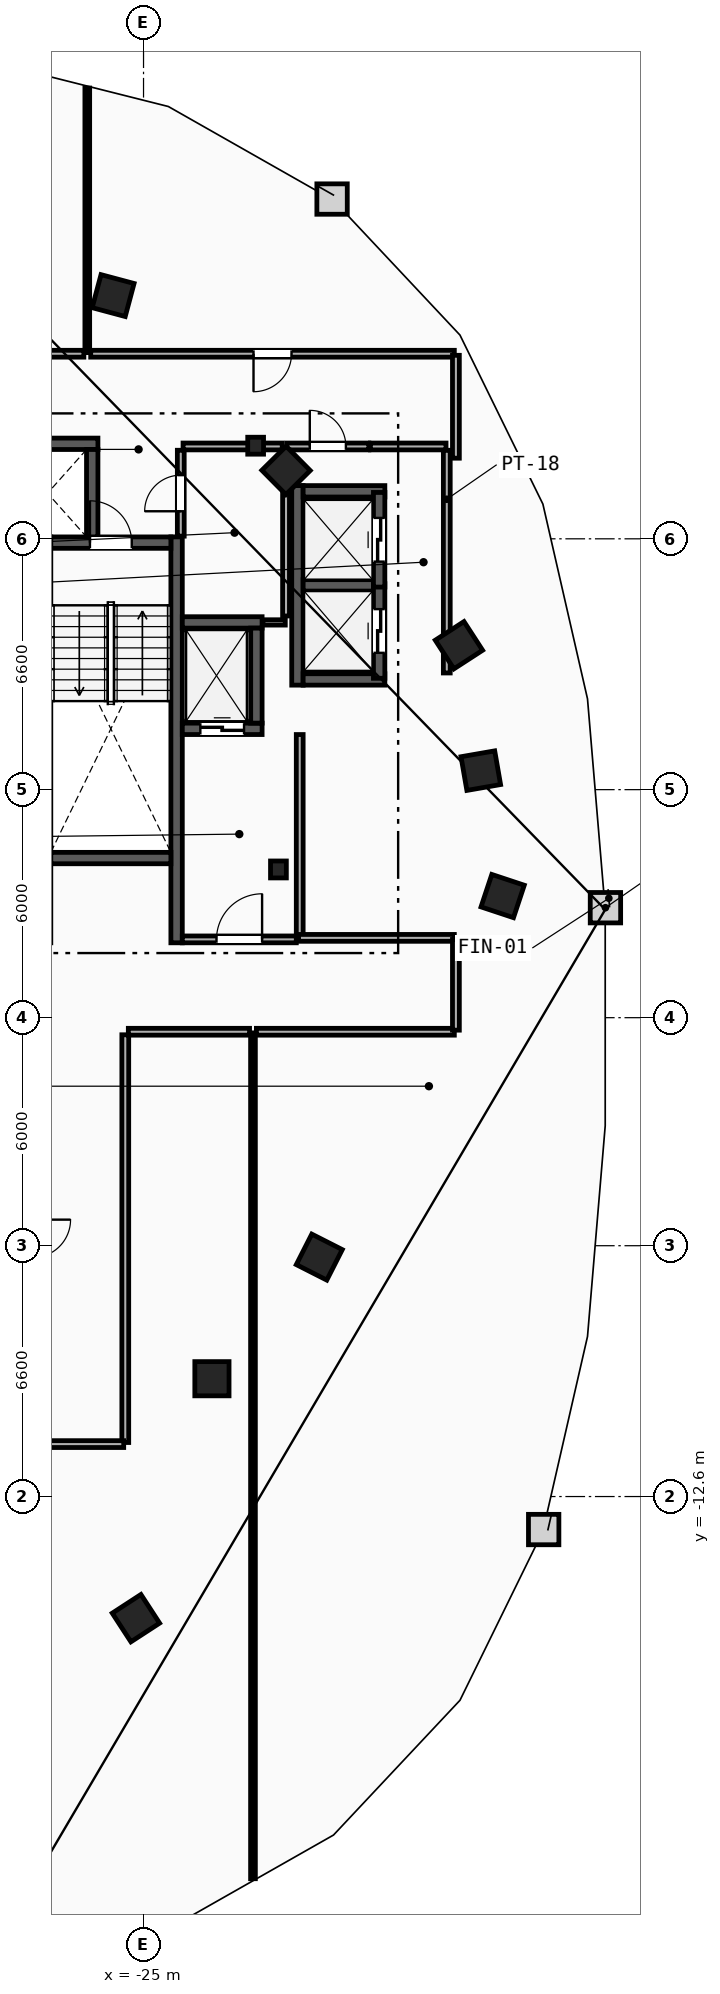
"""IFC4 building model, lengths in metres.
Left out: names, types, materials, properties, quantities, classifications, styles, units other than length and angle.
Written with IfcOpenShell. Run it as: python <this file> out.ifc"""

import sys

from ifc_helpers import new_model, si_unit, direction, frame, frame_2d, origin, origin_2d, place, context, subcontext, project, spatial, rectangle, i_section, extrude, element, fill, save


model = new_model("IFC4")
c1 = context("Model", 3, precision=1e-05, world=origin(), true_north=direction((0.0, 1.0)))
c2 = subcontext(c1, "Body", "Model", "MODEL_VIEW")
j1 = project(units=[si_unit("LENGTHUNIT", "METRE"), si_unit("PLANEANGLEUNIT", "RADIAN")], contexts=[c1])
p1 = place(None, origin())
s1 = spatial("IfcSite", under=j1, at=p1, CompositionType="ELEMENT")
p2 = place(p1, origin())
s2 = spatial("IfcBuilding", under=s1, at=p2, CompositionType="ELEMENT")
p3 = place(p2, frame((0.0, 0.0, 191.8)))
s3 = spatial("IfcBuildingStorey", under=s2, at=p3, CompositionType="ELEMENT", Elevation=191.8)
for number, where, z_axis, x_axis in (
    (1, (-21.45, 3.9, 0.0), (0.0, 0.0, 1.0), (1.0, 0.0, 0.0)),
    (2, (-22.05, 15.05, 0.0), (0.0, 0.0, 1.0), (1.0, 0.0, 0.0)),
):
    element("IfcColumn", number, at=place(p3, frame(where, z_axis=z_axis, x_axis=x_axis)), inside=s3, PredefinedType="COLUMN", context=c2, shape_type="SweptSolid", body=[
        extrude(i_section(OverallWidth=0.416, OverallDepth=0.446, WebThickness=0.039, FlangeThickness=0.063, FilletRadius=0.018, at=origin_2d()), origin(), (0.0, 0.0, 1.0), 3.6),
    ])
for number, where, z_axis, x_axis in (
    (3, (-23.2, -9.5, 0.0), (0.0, 0.0, 1.0), (1.0, 0.0, 0.0)),
    (4, (-15.55, 3.2, 0.0), (0.0, 0.0, 1.0), (0.315, 0.949, 0.0)),
    (5, (-16.125, 6.5, 0.0), (0.0, 0.0, 1.0), (-0.172, 0.985, 0.0)),
    (6, (-16.7, 9.8, 0.0), (0.0, 0.0, 1.0), (-0.544, 0.839, 0.0)),
    (7, (-21.25, 14.4, 0.0), (0.0, 0.0, 1.0), (-0.703, 0.711, 0.0)),
    (8, (-25.8, 19.0, 0.0), (0.0, 0.0, 1.0), (-0.966, 0.259, 0.0)),
    (9, (-25.2, -15.8, 0.0), (0.0, 0.0, 1.0), (0.838, 0.546, 0.0)),
    (10, (-20.375, -6.3, 0.0), (0.0, 0.0, 1.0), (0.453, 0.892, 0.0)),
):
    element("IfcColumn", number, at=place(p3, frame(where, z_axis=z_axis, x_axis=x_axis)), inside=s3, PredefinedType="COLUMN", context=c2, shape_type="SweptSolid", body=[
        extrude(rectangle(XDim=0.9, YDim=0.9, at=origin_2d()), origin(), (0.0, 0.0, 1.0), 3.6),
    ])
p4 = place(p3, frame((-24.13, 1.97, 0.0), z_axis=(0.0, 0.0, 1.0), x_axis=(0.0, 1.0, 0.0)))
e11 = element("IfcWall", 11, at=p4, inside=s3, PredefinedType="SHEAR", context=c2, shape_type="SweptSolid", body=[
    extrude(rectangle(XDim=10.68, YDim=0.3, at=frame_2d((5.34, 0.0))), origin(), (0.0, 0.0, 1.0), 3.34),
])
p5 = place(p3, frame((-27.44, 12.5, 0.0), z_axis=(0.0, 0.0, 1.0), x_axis=(1.0, 0.0, 0.0)))
e12 = element("IfcWall", 12, at=p5, inside=s3, PredefinedType="SHEAR", context=c2, shape_type="SweptSolid", body=[
    extrude(rectangle(XDim=3.16, YDim=0.3, at=frame_2d((1.58, 0.0))), origin(), (0.0, 0.0, 1.0), 3.34),
])
p6 = place(p5, frame((1.03, 0.0, 0.0)))
e13 = element("IfcOpeningElement", 13, at=p6, cuts=e12, PredefinedType="OPENING", context=c2, shape_type="SweptSolid", body=[
    extrude(rectangle(XDim=1.1, YDim=2.15, at=frame_2d((0.55, 1.075))), frame((0.0, 0.16, 0.0), z_axis=(0.0, -1.0, 0.0), x_axis=(1.0, 0.0, 0.0)), (0.0, 0.0, 1.0), 0.32),
])
p7 = place(p3, frame((-27.44, 4.2, 0.0), z_axis=(0.0, 0.0, 1.0), x_axis=(1.0, 0.0, 0.0)))
e14 = element("IfcWall", 14, at=p7, inside=s3, PredefinedType="SHEAR", context=c2, shape_type="SweptSolid", body=[
    extrude(rectangle(XDim=3.16, YDim=0.3, at=frame_2d((1.58, 0.0))), origin(), (0.0, 0.0, 1.0), 3.34),
])
p8 = place(p3, frame((-20.89, 2.15, 0.0), z_axis=(0.0, 0.0, 1.0), x_axis=(0.0, 1.0, 0.0)))
e15 = element("IfcWall", 15, at=p8, inside=s3, PredefinedType="PARTITIONING", context=c2, shape_type="SweptSolid", body=[
    extrude(rectangle(XDim=5.3, YDim=0.18, at=frame_2d((2.65, 0.0))), origin(), (0.0, 0.0, 1.0), 3.34),
])
p9 = place(p3, frame((-23.98, 2.06, 0.0), z_axis=(0.0, 0.0, 1.0), x_axis=(1.0, 0.0, 0.0)))
e16 = element("IfcWall", 16, at=p9, inside=s3, PredefinedType="PARTITIONING", context=c2, shape_type="SweptSolid", body=[
    extrude(rectangle(XDim=3.0, YDim=0.18, at=frame_2d((1.5, 0.0))), origin(), (0.0, 0.0, 1.0), 3.34),
])
p10 = place(p9, frame((0.9, 0.0, 0.0)))
e17 = element("IfcOpeningElement", 17, at=p10, cuts=e16, PredefinedType="OPENING", context=c2, shape_type="SweptSolid", body=[
    extrude(rectangle(XDim=1.2, YDim=2.15, at=frame_2d((0.6, 1.075))), frame((0.0, 0.1, 0.0), z_axis=(0.0, -1.0, 0.0), x_axis=(1.0, 0.0, 0.0)), (0.0, 0.0, 1.0), 0.2),
])
p11 = place(p3, frame((-23.98, 7.6, 0.0), z_axis=(0.0, 0.0, 1.0), x_axis=(1.0, 0.0, 0.0)))
e18 = element("IfcWall", 18, at=p11, inside=s3, PredefinedType="SHEAR", context=c2, shape_type="SweptSolid", body=[
    extrude(rectangle(XDim=2.1, YDim=0.3, at=frame_2d((1.05, 0.0))), origin(), (0.0, 0.0, 1.0), 3.34),
])
p12 = place(p11, frame((0.475, 0.0, 0.0)))
e19 = element("IfcOpeningElement", 19, at=p12, cuts=e18, PredefinedType="OPENING", context=c2, shape_type="SweptSolid", body=[
    extrude(rectangle(XDim=1.15, YDim=2.2, at=frame_2d((0.575, 1.1))), frame((0.0, 0.16, 0.0), z_axis=(0.0, -1.0, 0.0), x_axis=(1.0, 0.0, 0.0)), (0.0, 0.0, 1.0), 0.32),
])
p13 = place(p3, frame((-23.98, 10.4, 0.0), z_axis=(0.0, 0.0, 1.0), x_axis=(1.0, 0.0, 0.0)))
e20 = element("IfcWall", 20, at=p13, inside=s3, PredefinedType="SHEAR", context=c2, shape_type="SweptSolid", body=[
    extrude(rectangle(XDim=2.1, YDim=0.3, at=frame_2d((1.05, 0.0))), origin(), (0.0, 0.0, 1.0), 3.34),
])
for number, where, z_axis, x_axis in (
    (21, (-22.03, 7.75, 0.0), (0.0, 0.0, 1.0), (0.0, 1.0, 0.0)),
    (22, (-28.7, 15.1, 0.0), (0.0, 0.0, 1.0), (1.0, 0.0, 0.0)),
):
    element("IfcWall", number, at=place(p3, frame(where, z_axis=z_axis, x_axis=x_axis)), inside=s3, PredefinedType="SHEAR", context=c2, shape_type="SweptSolid", body=[
        extrude(rectangle(XDim=2.5, YDim=0.3, at=frame_2d((1.25, 0.0))), origin(), (0.0, 0.0, 1.0), 3.34),
    ])
p14 = place(p3, frame((-26.35, 12.65, 0.0), z_axis=(0.0, 0.0, 1.0), x_axis=(0.0, 1.0, 0.0)))
e23 = element("IfcWall", 23, at=p14, inside=s3, PredefinedType="SHEAR", context=c2, shape_type="SweptSolid", body=[
    extrude(rectangle(XDim=2.3, YDim=0.3, at=frame_2d((1.15, 0.0))), origin(), (0.0, 0.0, 1.0), 3.34),
])
p15 = place(p3, frame((-20.95, 8.75, 0.0), z_axis=(0.0, 0.0, 1.0), x_axis=(0.0, 1.0, 0.0)))
e24 = element("IfcWall", 24, at=p15, inside=s3, PredefinedType="SHEAR", context=c2, shape_type="SweptSolid", body=[
    extrude(rectangle(XDim=5.25, YDim=0.3, at=frame_2d((2.625, 0.0))), origin(), (0.0, 0.0, 1.0), 3.34),
])
for number, where, z_axis, x_axis in (
    (25, (-20.8, 8.9, 0.0), (0.0, 0.0, 1.0), (1.0, 0.0, 0.0)),
    (26, (-20.8, 13.85, 0.0), (0.0, 0.0, 1.0), (1.0, 0.0, 0.0)),
):
    element("IfcWall", number, at=place(p3, frame(where, z_axis=z_axis, x_axis=x_axis)), inside=s3, PredefinedType="SHEAR", context=c2, shape_type="SweptSolid", body=[
        extrude(rectangle(XDim=2.15, YDim=0.3, at=frame_2d((1.075, 0.0))), origin(), (0.0, 0.0, 1.0), 3.34),
    ])
p16 = place(p3, frame((-20.8, 11.375, 0.0), z_axis=(0.0, 0.0, 1.0), x_axis=(1.0, 0.0, 0.0)))
e27 = element("IfcWall", 27, at=p16, inside=s3, PredefinedType="SHEAR", context=c2, shape_type="SweptSolid", body=[
    extrude(rectangle(XDim=1.85, YDim=0.3, at=frame_2d((0.925, 0.0))), origin(), (0.0, 0.0, 1.0), 3.34),
])
p17 = place(p3, frame((-18.8, 8.93, 0.0), z_axis=(0.0, 0.0, 1.0), x_axis=(0.0, 1.0, 0.0)))
e28 = element("IfcWall", 28, at=p17, inside=s3, PredefinedType="SHEAR", context=c2, shape_type="SweptSolid", body=[
    extrude(rectangle(XDim=2.49, YDim=0.3, at=frame_2d((1.245, 0.0))), origin(), (0.0, 0.0, 1.0), 3.34),
])
p18 = place(p17, frame((0.67, 0.0, 0.0)))
e29 = element("IfcOpeningElement", 29, at=p18, cuts=e28, PredefinedType="OPENING", context=c2, shape_type="SweptSolid", body=[
    extrude(rectangle(XDim=1.15, YDim=2.2, at=frame_2d((0.575, 1.1))), frame((0.0, 0.16, 0.0), z_axis=(0.0, -1.0, 0.0), x_axis=(1.0, 0.0, 0.0)), (0.0, 0.0, 1.0), 0.32),
])
p19 = place(p3, frame((-18.8, 11.33, 0.0), z_axis=(0.0, 0.0, 1.0), x_axis=(0.0, 1.0, 0.0)))
e30 = element("IfcWall", 30, at=p19, inside=s3, PredefinedType="SHEAR", context=c2, shape_type="SweptSolid", body=[
    extrude(rectangle(XDim=2.49, YDim=0.3, at=frame_2d((1.245, 0.0))), origin(), (0.0, 0.0, 1.0), 3.34),
])
p20 = place(p19, frame((0.67, 0.0, 0.0)))
e31 = element("IfcOpeningElement", 31, at=p20, cuts=e30, PredefinedType="OPENING", context=c2, shape_type="SweptSolid", body=[
    extrude(rectangle(XDim=1.15, YDim=2.2, at=frame_2d((0.575, 1.1))), frame((0.0, 0.16, 0.0), z_axis=(0.0, -1.0, 0.0), x_axis=(1.0, 0.0, 0.0)), (0.0, 0.0, 1.0), 0.32),
])
p21 = place(p3, frame((-17.02, 9.07, 0.0), z_axis=(0.0, 0.0, 1.0), x_axis=(0.0, 1.0, 0.0)))
e32 = element("IfcWall", 32, at=p21, inside=s3, PredefinedType="PARTITIONING", context=c2, shape_type="SweptSolid", body=[
    extrude(rectangle(XDim=5.86, YDim=0.18, at=frame_2d((2.93, 0.0))), origin(), (0.0, 0.0, 1.0), 3.34),
])
p22 = place(p3, frame((-21.23, 15.03, 0.0), z_axis=(0.0, 0.0, 1.0), x_axis=(1.0, 0.0, 0.0)))
e33 = element("IfcWall", 33, at=p22, inside=s3, PredefinedType="PARTITIONING", context=c2, shape_type="SweptSolid", body=[
    extrude(rectangle(XDim=2.16, YDim=0.18, at=frame_2d((1.08, 0.0))), origin(), (0.0, 0.0, 1.0), 3.34),
])
p23 = place(p22, frame((0.605, 0.0, 0.0)))
e34 = element("IfcOpeningElement", 34, at=p23, cuts=e33, PredefinedType="OPENING", context=c2, shape_type="SweptSolid", body=[
    extrude(rectangle(XDim=0.95, YDim=2.1, at=frame_2d((0.475, 1.05))), frame((0.0, 0.1, 0.0), z_axis=(0.0, -1.0, 0.0), x_axis=(1.0, 0.0, 0.0)), (0.0, 0.0, 1.0), 0.2),
])
p24 = place(p3, frame((-19.03, 15.03, 0.0), z_axis=(0.0, 0.0, 1.0), x_axis=(1.0, 0.0, 0.0)))
e35 = element("IfcWall", 35, at=p24, inside=s3, PredefinedType="PARTITIONING", context=c2, shape_type="SweptSolid", body=[
    extrude(rectangle(XDim=1.99, YDim=0.18, at=frame_2d((0.995, 0.0))), origin(), (0.0, 0.0, 1.0), 3.34),
])
p25 = place(p3, frame((-21.86, 10.4, 0.0), z_axis=(0.0, 0.0, 1.0), x_axis=(1.0, 0.0, 0.0)))
e36 = element("IfcWall", 36, at=p25, inside=s3, PredefinedType="PARTITIONING", context=c2, shape_type="SweptSolid", body=[
    extrude(rectangle(XDim=0.59, YDim=0.14, at=frame_2d((0.295, 0.0))), origin(), (0.0, 0.0, 1.0), 3.34),
])
p26 = place(p3, frame((-21.25, 10.57, 0.0), z_axis=(0.0, 0.0, 1.0), x_axis=(0.0, 1.0, 0.0)))
e37 = element("IfcWall", 37, at=p26, inside=s3, PredefinedType="PARTITIONING", context=c2, shape_type="SweptSolid", body=[
    extrude(rectangle(XDim=4.36, YDim=0.18, at=frame_2d((2.18, 0.0))), origin(), (0.0, 0.0, 1.0), 3.34),
])
p27 = place(p3, frame((-23.96, 15.03, 0.0), z_axis=(0.0, 0.0, 1.0), x_axis=(1.0, 0.0, 0.0)))
e38 = element("IfcWall", 38, at=p27, inside=s3, PredefinedType="PARTITIONING", context=c2, shape_type="SweptSolid", body=[
    extrude(rectangle(XDim=2.61, YDim=0.18, at=frame_2d((1.305, 0.0))), origin(), (0.0, 0.0, 1.0), 2.413),
])
p28 = place(p3, frame((-24.02, 12.67, 0.0), z_axis=(0.0, 0.0, 1.0), x_axis=(0.0, 1.0, 0.0)))
e39 = element("IfcWall", 39, at=p28, inside=s3, PredefinedType="PARTITIONING", context=c2, shape_type="SweptSolid", body=[
    extrude(rectangle(XDim=2.26, YDim=0.18, at=frame_2d((1.13, 0.0))), origin(), (0.0, 0.0, 1.0), 3.34),
])
p29 = place(p28, frame((0.655, 0.0, 0.0)))
e40 = element("IfcOpeningElement", 40, at=p29, cuts=e39, PredefinedType="OPENING", context=c2, shape_type="SweptSolid", body=[
    extrude(rectangle(XDim=0.95, YDim=2.1, at=frame_2d((0.475, 1.05))), frame((0.0, 0.1, 0.0), z_axis=(0.0, -1.0, 0.0), x_axis=(1.0, 0.0, 0.0)), (0.0, 0.0, 1.0), 0.2),
])
p30 = place(p3, frame((-22.12, -22.656, 0.0), z_axis=(0.0, 0.0, 1.0), x_axis=(0.0, 1.0, 0.0)))
e41 = element("IfcWall", 41, at=p30, inside=s3, PredefinedType="PARTITIONING", context=c2, shape_type="SweptSolid", body=[
    extrude(rectangle(XDim=22.256, YDim=0.125, at=frame_2d((11.128, 0.0))), origin(), (0.0, 0.0, 1.0), 2.724),
])
p31 = place(p3, frame((-26.48, 17.5, 0.0), z_axis=(0.0, 0.0, 1.0), x_axis=(0.0, 1.0, 0.0)))
e42 = element("IfcWall", 42, at=p31, inside=s3, PredefinedType="PARTITIONING", context=c2, shape_type="SweptSolid", body=[
    extrude(rectangle(XDim=6.961, YDim=0.125, at=frame_2d((3.48, 0.0))), origin(), (0.0, 0.0, 1.0), 3.34),
])
p32 = place(p3, frame((-25.48, -11.178, 0.0), z_axis=(0.0, 0.0, 1.0), x_axis=(0.0, 1.0, 0.0)))
e43 = element("IfcWall", 43, at=p32, inside=s3, PredefinedType="PARTITIONING", context=c2, shape_type="SweptSolid", body=[
    extrude(rectangle(XDim=10.729, YDim=0.18, at=frame_2d((5.364, 0.0))), origin(), (0.0, 0.0, 1.0), 3.34),
])
p33 = place(p3, frame((-25.4, -0.37, 0.0), z_axis=(0.0, 0.0, 1.0), x_axis=(1.0, 0.0, 0.0)))
e44 = element("IfcWall", 44, at=p33, inside=s3, PredefinedType="PARTITIONING", context=c2, shape_type="SweptSolid", body=[
    extrude(rectangle(XDim=3.19, YDim=0.18, at=frame_2d((1.595, 0.0))), origin(), (0.0, 0.0, 1.0), 3.34),
])
p34 = place(p3, frame((-27.878, -11.22, 0.0), z_axis=(0.0, 0.0, 1.0), x_axis=(1.0, 0.0, 0.0)))
e45 = element("IfcWall", 45, at=p34, inside=s3, PredefinedType="PARTITIONING", context=c2, shape_type="SweptSolid", body=[
    extrude(rectangle(XDim=2.357, YDim=0.18, at=frame_2d((1.178, 0.0))), origin(), (0.0, 0.0, 1.0), 3.34),
])
p35 = place(p3, frame((-16.822, 17.47, 0.0), z_axis=(0.0, 0.0, 1.0), x_axis=(-1.0, 0.0, 0.0)))
e46 = element("IfcWall", 46, at=p35, inside=s3, PredefinedType="PARTITIONING", context=c2, shape_type="SweptSolid", body=[
    extrude(rectangle(XDim=9.568, YDim=0.18, at=frame_2d((4.784, 0.0))), origin(), (0.0, 0.0, 1.0), 3.34),
])
p36 = place(p35, frame((4.284, 0.0, 0.0)))
e47 = element("IfcOpeningElement", 47, at=p36, cuts=e46, PredefinedType="OPENING", context=c2, shape_type="SweptSolid", body=[
    extrude(rectangle(XDim=1.0, YDim=2.15, at=frame_2d((0.5, 1.075))), frame((0.0, 0.1, 0.0), z_axis=(0.0, -1.0, 0.0), x_axis=(1.0, 0.0, 0.0)), (0.0, 0.0, 1.0), 0.2),
])
p37 = place(p3, frame((-22.03, -0.37, 0.0), z_axis=(0.0, 0.0, 1.0), x_axis=(1.0, 0.0, 0.0)))
e48 = element("IfcWall", 48, at=p37, inside=s3, PredefinedType="PARTITIONING", context=c2, shape_type="SweptSolid", body=[
    extrude(rectangle(XDim=5.208, YDim=0.18, at=frame_2d((2.604, 0.0))), origin(), (0.0, 0.0, 1.0), 3.34),
])
p38 = place(p3, frame((-16.822, 2.1, 0.0), z_axis=(0.0, 0.0, 1.0), x_axis=(-1.0, 0.0, 0.0)))
e49 = element("IfcWall", 49, at=p38, inside=s3, PredefinedType="PARTITIONING", context=c2, shape_type="SweptSolid", body=[
    extrude(rectangle(XDim=4.098, YDim=0.18, at=frame_2d((2.049, 0.0))), origin(), (0.0, 0.0, 1.0), 3.34),
])
p39 = place(p3, frame((-16.78, 14.721, 0.0), z_axis=(0.0, 0.0, 1.0), x_axis=(0.0, 1.0, 0.0)))
e50 = element("IfcWall", 50, at=p39, inside=s3, PredefinedType="PARTITIONING", context=c2, shape_type="SweptSolid", body=[
    extrude(rectangle(XDim=2.707, YDim=0.18, at=frame_2d((1.354, 0.0))), origin(), (0.0, 0.0, 1.0), 3.34),
])
p40 = place(p3, frame((-16.78, -0.329, 0.0), z_axis=(0.0, 0.0, 1.0), x_axis=(0.0, 1.0, 0.0)))
e51 = element("IfcWall", 51, at=p40, inside=s3, PredefinedType="PARTITIONING", context=c2, shape_type="SweptSolid", body=[
    extrude(rectangle(XDim=2.387, YDim=0.18, at=frame_2d((1.194, 0.0))), origin(), (0.0, 0.0, 1.0), 3.34),
])
p41 = place(p3, frame((-26.57, 17.47, 0.0), z_axis=(0.0, 0.0, 1.0), x_axis=(-1.0, 0.0, 0.0)))
e52 = element("IfcWall", 52, at=p41, inside=s3, PredefinedType="PARTITIONING", context=c2, shape_type="SweptSolid", body=[
    extrude(rectangle(XDim=5.42, YDim=0.18, at=frame_2d((2.71, 0.0))), origin(), (0.0, 0.0, 1.0), 3.34),
])
p42 = place(p41, frame((1.91, 0.0, 0.0)))
e53 = element("IfcOpeningElement", 53, at=p42, cuts=e52, PredefinedType="OPENING", context=c2, shape_type="SweptSolid", body=[
    extrude(rectangle(XDim=1.6, YDim=2.2, at=frame_2d((0.8, 1.1))), frame((0.0, 0.1, 0.0), z_axis=(0.0, -1.0, 0.0), x_axis=(1.0, 0.0, 0.0)), (0.0, 0.0, 1.0), 0.2),
])
p43 = place(p6, origin())
e54 = element("IfcDoor", 54, at=p43, inside=s3, OperationType="SINGLE_SWING_LEFT", PredefinedType="DOOR", context=c2, shape_type="SweptSolid", body=[
    extrude(rectangle(XDim=1.1, YDim=2.15, at=frame_2d((0.55, 1.075))), frame((0.0, 0.025, 0.0), z_axis=(0.0, -1.0, 0.0), x_axis=(1.0, 0.0, 0.0)), (0.0, 0.0, 1.0), 0.05),
])
fill(e13, e54)
p44 = place(p10, origin())
e55 = element("IfcDoor", 55, at=p44, inside=s3, OperationType="SINGLE_SWING_RIGHT", PredefinedType="DOOR", context=c2, shape_type="SweptSolid", body=[
    extrude(rectangle(XDim=1.2, YDim=2.15, at=frame_2d((0.6, 1.075))), frame((0.0, 0.025, 0.0), z_axis=(0.0, -1.0, 0.0), x_axis=(1.0, 0.0, 0.0)), (0.0, 0.0, 1.0), 0.05),
])
fill(e17, e55)
p45 = place(p12, origin())
e56 = element("IfcDoor", 56, at=p45, inside=s3, OperationType="SLIDING_TO_LEFT", PredefinedType="TRAPDOOR", context=c2, shape_type="SweptSolid", body=[
    extrude(rectangle(XDim=1.15, YDim=2.2, at=frame_2d((0.575, 1.1))), frame((0.0, 0.025, 0.0), z_axis=(0.0, -1.0, 0.0), x_axis=(1.0, 0.0, 0.0)), (0.0, 0.0, 1.0), 0.05),
])
fill(e19, e56)
p46 = place(p18, origin())
e57 = element("IfcDoor", 57, at=p46, inside=s3, OperationType="SLIDING_TO_LEFT", PredefinedType="TRAPDOOR", context=c2, shape_type="SweptSolid", body=[
    extrude(rectangle(XDim=1.15, YDim=2.2, at=frame_2d((0.575, 1.1))), frame((0.0, 0.025, 0.0), z_axis=(0.0, -1.0, 0.0), x_axis=(1.0, 0.0, 0.0)), (0.0, 0.0, 1.0), 0.05),
])
fill(e29, e57)
p47 = place(p20, origin())
e58 = element("IfcDoor", 58, at=p47, inside=s3, OperationType="SLIDING_TO_LEFT", PredefinedType="TRAPDOOR", context=c2, shape_type="SweptSolid", body=[
    extrude(rectangle(XDim=1.15, YDim=2.2, at=frame_2d((0.575, 1.1))), frame((0.0, 0.025, 0.0), z_axis=(0.0, -1.0, 0.0), x_axis=(1.0, 0.0, 0.0)), (0.0, 0.0, 1.0), 0.05),
])
fill(e31, e58)
p48 = place(p36, origin())
e59 = element("IfcDoor", 59, at=p48, inside=s3, OperationType="SINGLE_SWING_RIGHT", PredefinedType="DOOR", context=c2, shape_type="SweptSolid", body=[
    extrude(rectangle(XDim=1.0, YDim=2.15, at=frame_2d((0.5, 1.075))), frame((0.0, 0.025, 0.0), z_axis=(0.0, -1.0, 0.0), x_axis=(1.0, 0.0, 0.0)), (0.0, 0.0, 1.0), 0.05),
])
fill(e47, e59)
p49 = place(p29, origin())
e60 = element("IfcDoor", 60, at=p49, inside=s3, OperationType="SINGLE_SWING_LEFT", PredefinedType="DOOR", context=c2, shape_type="SweptSolid", body=[
    extrude(rectangle(XDim=0.95, YDim=2.1, at=frame_2d((0.475, 1.05))), frame((0.0, 0.025, 0.0), z_axis=(0.0, -1.0, 0.0), x_axis=(1.0, 0.0, 0.0)), (0.0, 0.0, 1.0), 0.05),
])
fill(e40, e60)
p50 = place(p23, origin())
e61 = element("IfcDoor", 61, at=p50, inside=s3, OperationType="SINGLE_SWING_LEFT", PredefinedType="DOOR", context=c2, shape_type="SweptSolid", body=[
    extrude(rectangle(XDim=0.95, YDim=2.1, at=frame_2d((0.475, 1.05))), frame((0.0, 0.025, 0.0), z_axis=(0.0, -1.0, 0.0), x_axis=(1.0, 0.0, 0.0)), (0.0, 0.0, 1.0), 0.05),
])
fill(e34, e61)
save(model, sys.argv[1])
